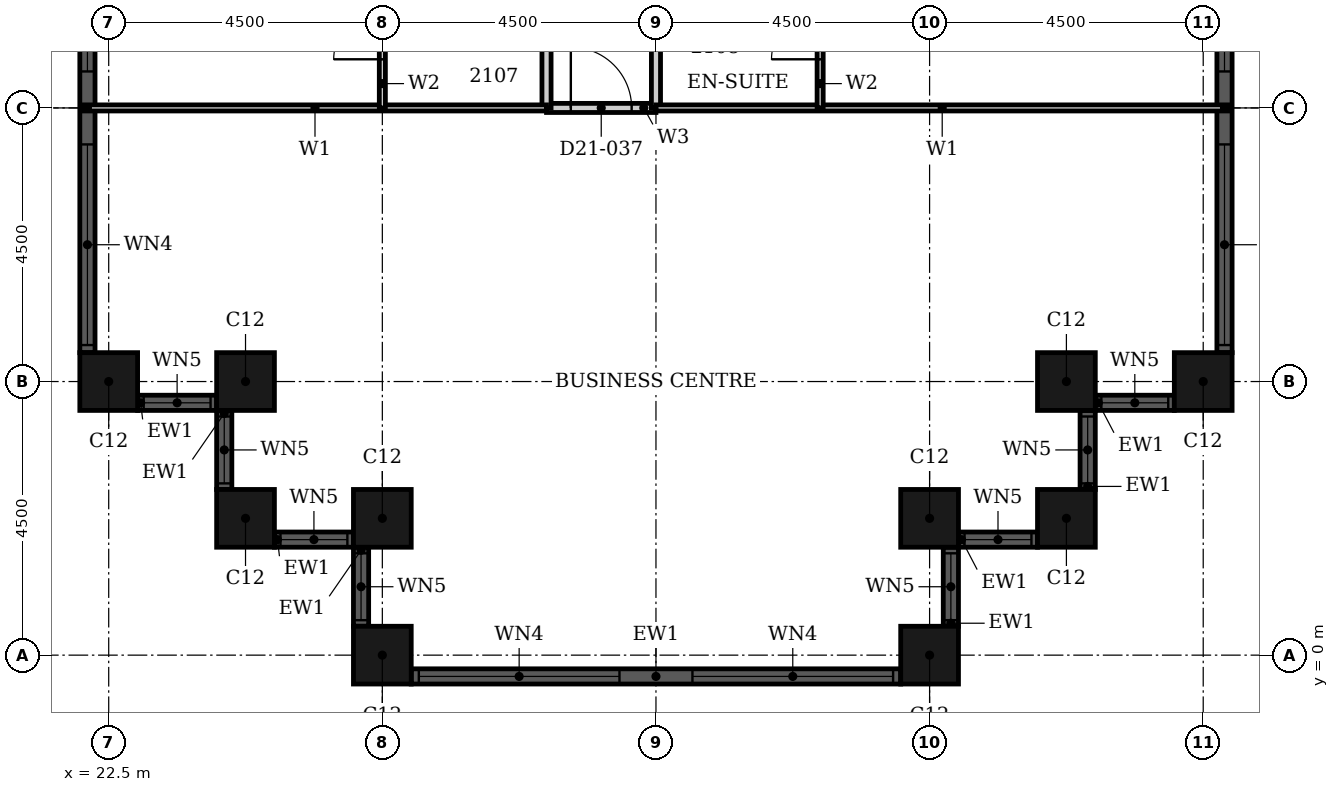
"""IFC4 building model, lengths in metres.
Left out: names, types, materials, properties, quantities, classifications, styles, units other than length and angle.
Written with IfcOpenShell. Run it as: python <this file> out.ifc"""

import sys

from ifc_helpers import new_model, si_unit, direction, frame, frame_2d, origin, origin_2d, place, context, subcontext, project, spatial, rectangle, hollow_rectangle, extrude, element, fill, save


model = new_model("IFC4")
c1 = context("Model", 3, precision=1e-05, world=origin(), true_north=direction((0.0, 1.0)))
c2 = subcontext(c1, "Body", "Model", "MODEL_VIEW")
j1 = project(units=[si_unit("LENGTHUNIT", "METRE"), si_unit("PLANEANGLEUNIT", "RADIAN")], contexts=[c1])
p1 = place(None, origin())
s1 = spatial("IfcSite", under=j1, at=p1, CompositionType="ELEMENT")
p2 = place(p1, origin())
s2 = spatial("IfcBuilding", under=s1, at=p2, CompositionType="ELEMENT")
p3 = place(p2, frame((0.0, 0.0, 88.8)))
s3 = spatial("IfcBuildingStorey", under=s2, at=p3, CompositionType="ELEMENT", Elevation=88.8)
for number, where, z_axis, x_axis in (
    (1, (22.5, 4.5, 0.0), (0.0, 0.0, 1.0), (1.0, 0.0, 0.0)),
    (2, (24.75, 4.5, 0.0), (0.0, 0.0, 1.0), (1.0, 0.0, 0.0)),
    (3, (24.75, 2.25, 0.0), (0.0, 0.0, 1.0), (1.0, 0.0, 0.0)),
    (4, (27.0, 2.25, 0.0), (0.0, 0.0, 1.0), (1.0, 0.0, 0.0)),
    (5, (27.0, 0.0, 0.0), (0.0, 0.0, 1.0), (1.0, 0.0, 0.0)),
    (6, (36.0, 0.0, 0.0), (0.0, 0.0, 1.0), (1.0, 0.0, 0.0)),
    (7, (36.0, 2.25, 0.0), (0.0, 0.0, 1.0), (1.0, 0.0, 0.0)),
    (8, (38.25, 2.25, 0.0), (0.0, 0.0, 1.0), (1.0, 0.0, 0.0)),
    (9, (38.25, 4.5, 0.0), (0.0, 0.0, 1.0), (1.0, 0.0, 0.0)),
    (10, (40.5, 4.5, 0.0), (0.0, 0.0, 1.0), (1.0, 0.0, 0.0)),
):
    element("IfcColumn", number, at=place(p3, frame(where, z_axis=z_axis, x_axis=x_axis)), inside=s3, PredefinedType="COLUMN", context=c2, shape_type="SweptSolid", body=[
        extrude(hollow_rectangle(XDim=0.95, YDim=0.95, WallThickness=0.03, at=origin_2d()), origin(), (0.0, 0.0, 1.0), 3.6),
    ])
p4 = place(p3, frame((22.975, 4.15, 0.0), z_axis=(0.0, 0.0, 1.0), x_axis=(1.0, 0.0, 0.0)))
e11 = element("IfcWall", 11, at=p4, inside=s3, PredefinedType="SOLIDWALL", context=c2, shape_type="SweptSolid", body=[
    extrude(rectangle(XDim=1.3, YDim=0.25, at=frame_2d((0.65, 0.0))), origin(), (0.0, 0.0, 1.0), 3.6),
])
p5 = place(p4, frame((0.1, 0.0, 0.9)))
e12 = element("IfcOpeningElement", 12, at=p5, cuts=e11, PredefinedType="OPENING", context=c2, shape_type="SweptSolid", body=[
    extrude(rectangle(XDim=1.1, YDim=2.08, at=frame_2d((0.55, 1.04))), frame((0.0, 0.135, 0.0), z_axis=(0.0, -1.0, 0.0), x_axis=(1.0, 0.0, 0.0)), (0.0, 0.0, 1.0), 0.27),
])
p6 = place(p3, frame((24.4, 4.025, 0.0), z_axis=(0.0, 0.0, 1.0), x_axis=(0.0, -1.0, 0.0)))
e13 = element("IfcWall", 13, at=p6, inside=s3, PredefinedType="SOLIDWALL", context=c2, shape_type="SweptSolid", body=[
    extrude(rectangle(XDim=1.3, YDim=0.25, at=frame_2d((0.65, 0.0))), origin(), (0.0, 0.0, 1.0), 3.6),
])
p7 = place(p6, frame((0.1, 0.0, 0.9)))
e14 = element("IfcOpeningElement", 14, at=p7, cuts=e13, PredefinedType="OPENING", context=c2, shape_type="SweptSolid", body=[
    extrude(rectangle(XDim=1.1, YDim=2.08, at=frame_2d((0.55, 1.04))), frame((0.0, 0.135, 0.0), z_axis=(0.0, -1.0, 0.0), x_axis=(1.0, 0.0, 0.0)), (0.0, 0.0, 1.0), 0.27),
])
p8 = place(p3, frame((25.225, 1.9, 0.0), z_axis=(0.0, 0.0, 1.0), x_axis=(1.0, 0.0, 0.0)))
e15 = element("IfcWall", 15, at=p8, inside=s3, PredefinedType="SOLIDWALL", context=c2, shape_type="SweptSolid", body=[
    extrude(rectangle(XDim=1.3, YDim=0.25, at=frame_2d((0.65, 0.0))), origin(), (0.0, 0.0, 1.0), 3.6),
])
p9 = place(p8, frame((0.1, 0.0, 0.9)))
e16 = element("IfcOpeningElement", 16, at=p9, cuts=e15, PredefinedType="OPENING", context=c2, shape_type="SweptSolid", body=[
    extrude(rectangle(XDim=1.1, YDim=2.08, at=frame_2d((0.55, 1.04))), frame((0.0, 0.135, 0.0), z_axis=(0.0, -1.0, 0.0), x_axis=(1.0, 0.0, 0.0)), (0.0, 0.0, 1.0), 0.27),
])
p10 = place(p3, frame((26.65, 1.775, 0.0), z_axis=(0.0, 0.0, 1.0), x_axis=(0.0, -1.0, 0.0)))
e17 = element("IfcWall", 17, at=p10, inside=s3, PredefinedType="SOLIDWALL", context=c2, shape_type="SweptSolid", body=[
    extrude(rectangle(XDim=1.3, YDim=0.25, at=frame_2d((0.65, 0.0))), origin(), (0.0, 0.0, 1.0), 3.6),
])
p11 = place(p10, frame((0.1, 0.0, 0.9)))
e18 = element("IfcOpeningElement", 18, at=p11, cuts=e17, PredefinedType="OPENING", context=c2, shape_type="SweptSolid", body=[
    extrude(rectangle(XDim=1.1, YDim=2.08, at=frame_2d((0.55, 1.04))), frame((0.0, 0.135, 0.0), z_axis=(0.0, -1.0, 0.0), x_axis=(1.0, 0.0, 0.0)), (0.0, 0.0, 1.0), 0.27),
])
p12 = place(p3, frame((27.475, -0.35, 0.0), z_axis=(0.0, 0.0, 1.0), x_axis=(1.0, 0.0, 0.0)))
e19 = element("IfcWall", 19, at=p12, inside=s3, PredefinedType="SOLIDWALL", context=c2, shape_type="SweptSolid", body=[
    extrude(rectangle(XDim=8.05, YDim=0.25, at=frame_2d((4.025, 0.0))), origin(), (0.0, 0.0, 1.0), 3.6),
])
p13 = place(p12, frame((0.125, 0.0, 0.9)))
e20 = element("IfcOpeningElement", 20, at=p13, cuts=e19, PredefinedType="OPENING", context=c2, shape_type="SweptSolid", body=[
    extrude(rectangle(XDim=3.3, YDim=2.08, at=frame_2d((1.65, 1.04))), frame((0.0, 0.135, 0.0), z_axis=(0.0, -1.0, 0.0), x_axis=(1.0, 0.0, 0.0)), (0.0, 0.0, 1.0), 0.27),
])
p14 = place(p12, frame((4.625, 0.0, 0.9)))
e21 = element("IfcOpeningElement", 21, at=p14, cuts=e19, PredefinedType="OPENING", context=c2, shape_type="SweptSolid", body=[
    extrude(rectangle(XDim=3.3, YDim=2.08, at=frame_2d((1.65, 1.04))), frame((0.0, 0.135, 0.0), z_axis=(0.0, -1.0, 0.0), x_axis=(1.0, 0.0, 0.0)), (0.0, 0.0, 1.0), 0.27),
])
p15 = place(p3, frame((36.35, 0.475, 0.0), z_axis=(0.0, 0.0, 1.0), x_axis=(0.0, 1.0, 0.0)))
e22 = element("IfcWall", 22, at=p15, inside=s3, PredefinedType="SOLIDWALL", context=c2, shape_type="SweptSolid", body=[
    extrude(rectangle(XDim=1.3, YDim=0.25, at=frame_2d((0.65, 0.0))), origin(), (0.0, 0.0, 1.0), 3.6),
])
p16 = place(p15, frame((0.1, 0.0, 0.9)))
e23 = element("IfcOpeningElement", 23, at=p16, cuts=e22, PredefinedType="OPENING", context=c2, shape_type="SweptSolid", body=[
    extrude(rectangle(XDim=1.1, YDim=2.08, at=frame_2d((0.55, 1.04))), frame((0.0, 0.135, 0.0), z_axis=(0.0, -1.0, 0.0), x_axis=(1.0, 0.0, 0.0)), (0.0, 0.0, 1.0), 0.27),
])
p17 = place(p3, frame((36.475, 1.9, 0.0), z_axis=(0.0, 0.0, 1.0), x_axis=(1.0, 0.0, 0.0)))
e24 = element("IfcWall", 24, at=p17, inside=s3, PredefinedType="SOLIDWALL", context=c2, shape_type="SweptSolid", body=[
    extrude(rectangle(XDim=1.3, YDim=0.25, at=frame_2d((0.65, 0.0))), origin(), (0.0, 0.0, 1.0), 3.6),
])
p18 = place(p17, frame((0.1, 0.0, 0.9)))
e25 = element("IfcOpeningElement", 25, at=p18, cuts=e24, PredefinedType="OPENING", context=c2, shape_type="SweptSolid", body=[
    extrude(rectangle(XDim=1.1, YDim=2.08, at=frame_2d((0.55, 1.04))), frame((0.0, 0.135, 0.0), z_axis=(0.0, -1.0, 0.0), x_axis=(1.0, 0.0, 0.0)), (0.0, 0.0, 1.0), 0.27),
])
p19 = place(p3, frame((38.6, 2.725, 0.0), z_axis=(0.0, 0.0, 1.0), x_axis=(0.0, 1.0, 0.0)))
e26 = element("IfcWall", 26, at=p19, inside=s3, PredefinedType="SOLIDWALL", context=c2, shape_type="SweptSolid", body=[
    extrude(rectangle(XDim=1.3, YDim=0.25, at=frame_2d((0.65, 0.0))), origin(), (0.0, 0.0, 1.0), 3.6),
])
p20 = place(p19, frame((0.1, 0.0, 0.9)))
e27 = element("IfcOpeningElement", 27, at=p20, cuts=e26, PredefinedType="OPENING", context=c2, shape_type="SweptSolid", body=[
    extrude(rectangle(XDim=1.1, YDim=2.08, at=frame_2d((0.55, 1.04))), frame((0.0, 0.135, 0.0), z_axis=(0.0, -1.0, 0.0), x_axis=(1.0, 0.0, 0.0)), (0.0, 0.0, 1.0), 0.27),
])
p21 = place(p3, frame((38.725, 4.15, 0.0), z_axis=(0.0, 0.0, 1.0), x_axis=(1.0, 0.0, 0.0)))
e28 = element("IfcWall", 28, at=p21, inside=s3, PredefinedType="SOLIDWALL", context=c2, shape_type="SweptSolid", body=[
    extrude(rectangle(XDim=1.3, YDim=0.25, at=frame_2d((0.65, 0.0))), origin(), (0.0, 0.0, 1.0), 3.6),
])
p22 = place(p21, frame((0.1, 0.0, 0.9)))
e29 = element("IfcOpeningElement", 29, at=p22, cuts=e28, PredefinedType="OPENING", context=c2, shape_type="SweptSolid", body=[
    extrude(rectangle(XDim=1.1, YDim=2.08, at=frame_2d((0.55, 1.04))), frame((0.0, 0.135, 0.0), z_axis=(0.0, -1.0, 0.0), x_axis=(1.0, 0.0, 0.0)), (0.0, 0.0, 1.0), 0.27),
])
p23 = place(p3, frame((40.85, 4.975, 0.0), z_axis=(0.0, 0.0, 1.0), x_axis=(0.0, 1.0, 0.0)))
e30 = element("IfcWall", 30, at=p23, inside=s3, PredefinedType="SOLIDWALL", context=c2, shape_type="SweptSolid", body=[
    extrude(rectangle(XDim=8.05, YDim=0.25, at=frame_2d((4.025, 0.0))), origin(), (0.0, 0.0, 1.0), 3.6),
])
p24 = place(p23, frame((0.125, 0.0, 0.9)))
e31 = element("IfcOpeningElement", 31, at=p24, cuts=e30, PredefinedType="OPENING", context=c2, shape_type="SweptSolid", body=[
    extrude(rectangle(XDim=3.3, YDim=2.08, at=frame_2d((1.65, 1.04))), frame((0.0, 0.135, 0.0), z_axis=(0.0, -1.0, 0.0), x_axis=(1.0, 0.0, 0.0)), (0.0, 0.0, 1.0), 0.27),
])
p25 = place(p23, frame((4.625, 0.0, 0.9)))
e32 = element("IfcOpeningElement", 32, at=p25, cuts=e30, PredefinedType="OPENING", context=c2, shape_type="SweptSolid", body=[
    extrude(rectangle(XDim=3.3, YDim=2.08, at=frame_2d((1.65, 1.04))), frame((0.0, 0.135, 0.0), z_axis=(0.0, -1.0, 0.0), x_axis=(1.0, 0.0, 0.0)), (0.0, 0.0, 1.0), 0.27),
])
p26 = place(p3, frame((22.15, 13.025, 0.0), z_axis=(0.0, 0.0, 1.0), x_axis=(0.0, -1.0, 0.0)))
e33 = element("IfcWall", 33, at=p26, inside=s3, PredefinedType="SOLIDWALL", context=c2, shape_type="SweptSolid", body=[
    extrude(rectangle(XDim=8.05, YDim=0.25, at=frame_2d((4.025, 0.0))), origin(), (0.0, 0.0, 1.0), 3.6),
])
p27 = place(p26, frame((0.125, 0.0, 0.9)))
e34 = element("IfcOpeningElement", 34, at=p27, cuts=e33, PredefinedType="OPENING", context=c2, shape_type="SweptSolid", body=[
    extrude(rectangle(XDim=3.3, YDim=2.08, at=frame_2d((1.65, 1.04))), frame((0.0, 0.135, 0.0), z_axis=(0.0, -1.0, 0.0), x_axis=(1.0, 0.0, 0.0)), (0.0, 0.0, 1.0), 0.27),
])
p28 = place(p26, frame((4.625, 0.0, 0.9)))
e35 = element("IfcOpeningElement", 35, at=p28, cuts=e33, PredefinedType="OPENING", context=c2, shape_type="SweptSolid", body=[
    extrude(rectangle(XDim=3.3, YDim=2.08, at=frame_2d((1.65, 1.04))), frame((0.0, 0.135, 0.0), z_axis=(0.0, -1.0, 0.0), x_axis=(1.0, 0.0, 0.0)), (0.0, 0.0, 1.0), 0.27),
])
p29 = place(p3, frame((29.7, 9.0, 0.0), z_axis=(0.0, 0.0, 1.0), x_axis=(1.0, 0.0, 0.0)))
e36 = element("IfcWall", 36, at=p29, inside=s3, PredefinedType="PARTITIONING", context=c2, shape_type="SweptSolid", body=[
    extrude(rectangle(XDim=1.8, YDim=0.15, at=frame_2d((0.9, 0.0))), origin(), (0.0, 0.0, 1.0), 3.3),
])
p30 = place(p29, frame((0.4, 0.0, 0.0)))
e37 = element("IfcOpeningElement", 37, at=p30, cuts=e36, PredefinedType="OPENING", context=c2, shape_type="SweptSolid", body=[
    extrude(rectangle(XDim=1.0, YDim=2.1, at=frame_2d((0.5, 1.05))), frame((0.0, 0.085, 0.0), z_axis=(0.0, -1.0, 0.0), x_axis=(1.0, 0.0, 0.0)), (0.0, 0.0, 1.0), 0.17),
])
p31 = place(p3, frame((29.7, 9.0, 0.0), z_axis=(0.0, 0.0, 1.0), x_axis=(0.0, 1.0, 0.0)))
e38 = element("IfcWall", 38, at=p31, inside=s3, PredefinedType="PARTITIONING", context=c2, shape_type="SweptSolid", body=[
    extrude(rectangle(XDim=11.7, YDim=0.15, at=frame_2d((5.85, 0.0))), origin(), (0.0, 0.0, 1.0), 3.3),
])
p32 = place(p31, frame((2.95, 0.0, 0.0)))
e39 = element("IfcOpeningElement", 39, at=p32, cuts=e38, PredefinedType="OPENING", context=c2, shape_type="SweptSolid", body=[
    extrude(rectangle(XDim=1.0, YDim=2.1, at=frame_2d((0.5, 1.05))), frame((0.0, 0.085, 0.0), z_axis=(0.0, -1.0, 0.0), x_axis=(1.0, 0.0, 0.0)), (0.0, 0.0, 1.0), 0.17),
])
p33 = place(p3, frame((31.5, 9.0, 0.0), z_axis=(0.0, 0.0, 1.0), x_axis=(0.0, 1.0, 0.0)))
e40 = element("IfcWall", 40, at=p33, inside=s3, PredefinedType="PARTITIONING", context=c2, shape_type="SweptSolid", body=[
    extrude(rectangle(XDim=11.7, YDim=0.15, at=frame_2d((5.85, 0.0))), origin(), (0.0, 0.0, 1.0), 2.58),
])
p34 = place(p33, frame((2.95, 0.0, 0.0)))
e41 = element("IfcOpeningElement", 41, at=p34, cuts=e40, PredefinedType="OPENING", context=c2, shape_type="SweptSolid", body=[
    extrude(rectangle(XDim=1.0, YDim=2.1, at=frame_2d((0.5, 1.05))), frame((0.0, 0.085, 0.0), z_axis=(0.0, -1.0, 0.0), x_axis=(1.0, 0.0, 0.0)), (0.0, 0.0, 1.0), 0.17),
])
p35 = place(p3, frame((31.5, 9.0, 0.0), z_axis=(0.0, 0.0, 1.0), x_axis=(1.0, 0.0, 0.0)))
e42 = element("IfcWall", 42, at=p35, inside=s3, PredefinedType="PARTITIONING", context=c2, shape_type="SweptSolid", body=[
    extrude(rectangle(XDim=9.415, YDim=0.1, at=frame_2d((4.708, 0.0))), origin(), (0.0, 0.0, 1.0), 3.3),
])
p36 = place(p3, frame((22.085, 9.0, 0.0), z_axis=(0.0, 0.0, 1.0), x_axis=(1.0, 0.0, 0.0)))
e43 = element("IfcWall", 43, at=p36, inside=s3, PredefinedType="PARTITIONING", context=c2, shape_type="SweptSolid", body=[
    extrude(rectangle(XDim=7.615, YDim=0.1, at=frame_2d((3.808, 0.0))), origin(), (0.0, 0.0, 1.0), 3.3),
])
p37 = place(p3, frame((27.0, 9.0, 0.0), z_axis=(0.0, 0.0, 1.0), x_axis=(0.0, 1.0, 0.0)))
e44 = element("IfcWall", 44, at=p37, inside=s3, PredefinedType="PARTITIONING", context=c2, shape_type="SweptSolid", body=[
    extrude(rectangle(XDim=2.4, YDim=0.1, at=frame_2d((1.2, 0.0))), origin(), (0.0, 0.0, 1.0), 2.58),
])
p38 = place(p37, frame((0.8, 0.0, 0.0)))
e45 = element("IfcOpeningElement", 45, at=p38, cuts=e44, PredefinedType="OPENING", context=c2, shape_type="SweptSolid", body=[
    extrude(rectangle(XDim=0.8, YDim=2.1, at=frame_2d((0.4, 1.05))), frame((0.0, 0.06, 0.0), z_axis=(0.0, -1.0, 0.0), x_axis=(1.0, 0.0, 0.0)), (0.0, 0.0, 1.0), 0.12),
])
p39 = place(p3, frame((34.2, 9.0, 0.0), z_axis=(0.0, 0.0, 1.0), x_axis=(0.0, 1.0, 0.0)))
e46 = element("IfcWall", 46, at=p39, inside=s3, PredefinedType="PARTITIONING", context=c2, shape_type="SweptSolid", body=[
    extrude(rectangle(XDim=2.4, YDim=0.1, at=frame_2d((1.2, 0.0))), origin(), (0.0, 0.0, 1.0), 3.3),
])
p40 = place(p39, frame((0.8, 0.0, 0.0)))
e47 = element("IfcOpeningElement", 47, at=p40, cuts=e46, PredefinedType="OPENING", context=c2, shape_type="SweptSolid", body=[
    extrude(rectangle(XDim=0.8, YDim=2.1, at=frame_2d((0.4, 1.05))), frame((0.0, 0.06, 0.0), z_axis=(0.0, -1.0, 0.0), x_axis=(1.0, 0.0, 0.0)), (0.0, 0.0, 1.0), 0.12),
])
p41 = place(p5, origin())
e48 = element("IfcWindow", 48, at=p41, inside=s3, PartitioningType="SINGLE_PANEL", PredefinedType="WINDOW", context=c2, shape_type="SweptSolid", body=[
    extrude(rectangle(XDim=1.1, YDim=2.08, at=frame_2d((0.55, 1.04))), frame((0.0, 0.03, 0.0), z_axis=(0.0, -1.0, 0.0), x_axis=(1.0, 0.0, 0.0)), (0.0, 0.0, 1.0), 0.06),
])
fill(e12, e48)
p42 = place(p7, origin())
e49 = element("IfcWindow", 49, at=p42, inside=s3, PartitioningType="SINGLE_PANEL", PredefinedType="WINDOW", context=c2, shape_type="SweptSolid", body=[
    extrude(rectangle(XDim=1.1, YDim=2.08, at=frame_2d((0.55, 1.04))), frame((0.0, 0.03, 0.0), z_axis=(0.0, -1.0, 0.0), x_axis=(1.0, 0.0, 0.0)), (0.0, 0.0, 1.0), 0.06),
])
fill(e14, e49)
p43 = place(p9, origin())
e50 = element("IfcWindow", 50, at=p43, inside=s3, PartitioningType="SINGLE_PANEL", PredefinedType="WINDOW", context=c2, shape_type="SweptSolid", body=[
    extrude(rectangle(XDim=1.1, YDim=2.08, at=frame_2d((0.55, 1.04))), frame((0.0, 0.03, 0.0), z_axis=(0.0, -1.0, 0.0), x_axis=(1.0, 0.0, 0.0)), (0.0, 0.0, 1.0), 0.06),
])
fill(e16, e50)
p44 = place(p11, origin())
e51 = element("IfcWindow", 51, at=p44, inside=s3, PartitioningType="SINGLE_PANEL", PredefinedType="WINDOW", context=c2, shape_type="SweptSolid", body=[
    extrude(rectangle(XDim=1.1, YDim=2.08, at=frame_2d((0.55, 1.04))), frame((0.0, 0.03, 0.0), z_axis=(0.0, -1.0, 0.0), x_axis=(1.0, 0.0, 0.0)), (0.0, 0.0, 1.0), 0.06),
])
fill(e18, e51)
p45 = place(p13, origin())
e52 = element("IfcWindow", 52, at=p45, inside=s3, PartitioningType="SINGLE_PANEL", PredefinedType="WINDOW", context=c2, shape_type="SweptSolid", body=[
    extrude(rectangle(XDim=3.3, YDim=2.08, at=frame_2d((1.65, 1.04))), frame((0.0, 0.03, 0.0), z_axis=(0.0, -1.0, 0.0), x_axis=(1.0, 0.0, 0.0)), (0.0, 0.0, 1.0), 0.06),
])
fill(e20, e52)
p46 = place(p14, origin())
e53 = element("IfcWindow", 53, at=p46, inside=s3, PartitioningType="SINGLE_PANEL", PredefinedType="WINDOW", context=c2, shape_type="SweptSolid", body=[
    extrude(rectangle(XDim=3.3, YDim=2.08, at=frame_2d((1.65, 1.04))), frame((0.0, 0.03, 0.0), z_axis=(0.0, -1.0, 0.0), x_axis=(1.0, 0.0, 0.0)), (0.0, 0.0, 1.0), 0.06),
])
fill(e21, e53)
p47 = place(p16, origin())
e54 = element("IfcWindow", 54, at=p47, inside=s3, PartitioningType="SINGLE_PANEL", PredefinedType="WINDOW", context=c2, shape_type="SweptSolid", body=[
    extrude(rectangle(XDim=1.1, YDim=2.08, at=frame_2d((0.55, 1.04))), frame((0.0, 0.03, 0.0), z_axis=(0.0, -1.0, 0.0), x_axis=(1.0, 0.0, 0.0)), (0.0, 0.0, 1.0), 0.06),
])
fill(e23, e54)
p48 = place(p18, origin())
e55 = element("IfcWindow", 55, at=p48, inside=s3, PartitioningType="SINGLE_PANEL", PredefinedType="WINDOW", context=c2, shape_type="SweptSolid", body=[
    extrude(rectangle(XDim=1.1, YDim=2.08, at=frame_2d((0.55, 1.04))), frame((0.0, 0.03, 0.0), z_axis=(0.0, -1.0, 0.0), x_axis=(1.0, 0.0, 0.0)), (0.0, 0.0, 1.0), 0.06),
])
fill(e25, e55)
p49 = place(p20, origin())
e56 = element("IfcWindow", 56, at=p49, inside=s3, PartitioningType="SINGLE_PANEL", PredefinedType="WINDOW", context=c2, shape_type="SweptSolid", body=[
    extrude(rectangle(XDim=1.1, YDim=2.08, at=frame_2d((0.55, 1.04))), frame((0.0, 0.03, 0.0), z_axis=(0.0, -1.0, 0.0), x_axis=(1.0, 0.0, 0.0)), (0.0, 0.0, 1.0), 0.06),
])
fill(e27, e56)
p50 = place(p22, origin())
e57 = element("IfcWindow", 57, at=p50, inside=s3, PartitioningType="SINGLE_PANEL", PredefinedType="WINDOW", context=c2, shape_type="SweptSolid", body=[
    extrude(rectangle(XDim=1.1, YDim=2.08, at=frame_2d((0.55, 1.04))), frame((0.0, 0.03, 0.0), z_axis=(0.0, -1.0, 0.0), x_axis=(1.0, 0.0, 0.0)), (0.0, 0.0, 1.0), 0.06),
])
fill(e29, e57)
p51 = place(p24, origin())
e58 = element("IfcWindow", 58, at=p51, inside=s3, PartitioningType="SINGLE_PANEL", PredefinedType="WINDOW", context=c2, shape_type="SweptSolid", body=[
    extrude(rectangle(XDim=3.3, YDim=2.08, at=frame_2d((1.65, 1.04))), frame((0.0, 0.03, 0.0), z_axis=(0.0, -1.0, 0.0), x_axis=(1.0, 0.0, 0.0)), (0.0, 0.0, 1.0), 0.06),
])
fill(e31, e58)
p52 = place(p25, origin())
e59 = element("IfcWindow", 59, at=p52, inside=s3, PartitioningType="SINGLE_PANEL", PredefinedType="WINDOW", context=c2, shape_type="SweptSolid", body=[
    extrude(rectangle(XDim=3.3, YDim=2.08, at=frame_2d((1.65, 1.04))), frame((0.0, 0.03, 0.0), z_axis=(0.0, -1.0, 0.0), x_axis=(1.0, 0.0, 0.0)), (0.0, 0.0, 1.0), 0.06),
])
fill(e32, e59)
p53 = place(p27, origin())
e60 = element("IfcWindow", 60, at=p53, inside=s3, PartitioningType="SINGLE_PANEL", PredefinedType="WINDOW", context=c2, shape_type="SweptSolid", body=[
    extrude(rectangle(XDim=3.3, YDim=2.08, at=frame_2d((1.65, 1.04))), frame((0.0, 0.03, 0.0), z_axis=(0.0, -1.0, 0.0), x_axis=(1.0, 0.0, 0.0)), (0.0, 0.0, 1.0), 0.06),
])
fill(e34, e60)
p54 = place(p28, origin())
e61 = element("IfcWindow", 61, at=p54, inside=s3, PartitioningType="SINGLE_PANEL", PredefinedType="WINDOW", context=c2, shape_type="SweptSolid", body=[
    extrude(rectangle(XDim=3.3, YDim=2.08, at=frame_2d((1.65, 1.04))), frame((0.0, 0.03, 0.0), z_axis=(0.0, -1.0, 0.0), x_axis=(1.0, 0.0, 0.0)), (0.0, 0.0, 1.0), 0.06),
])
fill(e35, e61)
p55 = place(p38, origin())
e62 = element("IfcDoor", 62, at=p55, inside=s3, OperationType="SINGLE_SWING_RIGHT", PredefinedType="DOOR", context=c2, shape_type="SweptSolid", body=[
    extrude(rectangle(XDim=0.8, YDim=2.1, at=frame_2d((0.4, 1.05))), frame((0.0, 0.025, 0.0), z_axis=(0.0, -1.0, 0.0), x_axis=(1.0, 0.0, 0.0)), (0.0, 0.0, 1.0), 0.05),
])
fill(e45, e62)
p56 = place(p40, origin())
e63 = element("IfcDoor", 63, at=p56, inside=s3, OperationType="SINGLE_SWING_RIGHT", PredefinedType="DOOR", context=c2, shape_type="SweptSolid", body=[
    extrude(rectangle(XDim=0.8, YDim=2.1, at=frame_2d((0.4, 1.05))), frame((0.0, 0.025, 0.0), z_axis=(0.0, -1.0, 0.0), x_axis=(1.0, 0.0, 0.0)), (0.0, 0.0, 1.0), 0.05),
])
fill(e47, e63)
p57 = place(p30, origin())
e64 = element("IfcDoor", 64, at=p57, inside=s3, OperationType="SINGLE_SWING_RIGHT", PredefinedType="DOOR", context=c2, shape_type="SweptSolid", body=[
    extrude(rectangle(XDim=1.0, YDim=2.1, at=frame_2d((0.5, 1.05))), frame((0.0, 0.025, 0.0), z_axis=(0.0, -1.0, 0.0), x_axis=(1.0, 0.0, 0.0)), (0.0, 0.0, 1.0), 0.05),
])
fill(e37, e64)
save(model, sys.argv[1])
